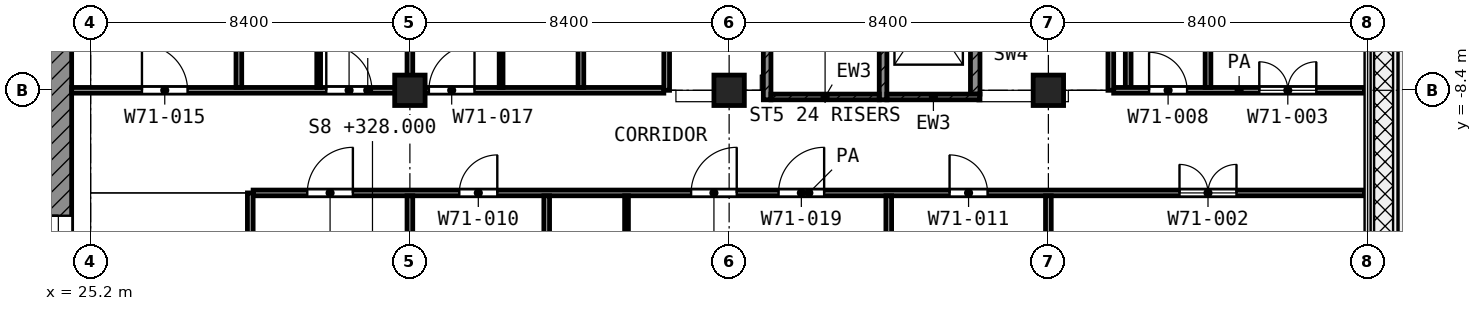
"""IFC4 building model, lengths in metres.
Left out: names, types, materials, properties, quantities, classifications, styles, units other than length and angle.
Written with IfcOpenShell. Run it as: python <this file> out.ifc"""

import sys

from ifc_helpers import new_model, si_unit, direction, frame, frame_2d, origin, origin_2d, place, context, subcontext, project, spatial, rectangle, extrude, element, fill, save


model = new_model("IFC4")
c1 = context("Model", 3, precision=1e-05, world=origin(), true_north=direction((0.0, 1.0)))
c2 = subcontext(c1, "Body", "Model", "MODEL_VIEW")
j1 = project(units=[si_unit("LENGTHUNIT", "METRE"), si_unit("PLANEANGLEUNIT", "RADIAN")], contexts=[c1])
p1 = place(None, origin())
s1 = spatial("IfcSite", under=j1, at=p1, CompositionType="ELEMENT")
p2 = place(p1, origin())
s2 = spatial("IfcBuilding", under=s1, at=p2, CompositionType="ELEMENT")
p3 = place(p2, frame((0.0, 0.0, 328.0)))
s3 = spatial("IfcBuildingStorey", under=s2, at=p3, CompositionType="ELEMENT", Elevation=328.0)
for number, where, z_axis, x_axis in (
    (1, (33.6, -8.4, 0.0), (0.0, 0.0, 1.0), (1.0, 0.0, 0.0)),
    (2, (42.0, -8.4, 0.0), (0.0, 0.0, 1.0), (1.0, 0.0, 0.0)),
    (3, (50.4, -8.4, 0.0), (0.0, 0.0, 1.0), (1.0, 0.0, 0.0)),
):
    element("IfcColumn", number, at=place(p3, frame(where, z_axis=z_axis, x_axis=x_axis)), inside=s3, PredefinedType="COLUMN", context=c2, shape_type="SweptSolid", body=[
        extrude(rectangle(XDim=0.8, YDim=0.8, at=origin_2d()), origin(), (0.0, 0.0, 1.0), 4.2),
    ])
p4 = place(p3, frame((24.35, -24.0, 0.0), z_axis=(0.0, 0.0, 1.0), x_axis=(0.0, 1.0, 0.0)))
e4 = element("IfcWall", 4, at=p4, inside=s3, PredefinedType="SHEAR", context=c2, shape_type="SweptSolid", body=[
    extrude(rectangle(XDim=18.6, YDim=0.7, at=frame_2d((9.3, 0.0))), origin(), (0.0, 0.0, 1.0), 3.78),
])
p5 = place(p4, frame((10.5, 0.0, 0.0)))
e5 = element("IfcOpeningElement", 5, at=p5, cuts=e4, PredefinedType="OPENING", context=c2, shape_type="SweptSolid", body=[
    extrude(rectangle(XDim=1.8, YDim=2.1, at=frame_2d((0.9, 1.05))), frame((0.0, 0.36, 0.0), z_axis=(0.0, -1.0, 0.0), x_axis=(1.0, 0.0, 0.0)), (0.0, 0.0, 1.0), 0.72),
])
p6 = place(p3, frame((43.0, -8.65, 0.0), z_axis=(0.0, 0.0, 1.0), x_axis=(0.0, 1.0, 0.0)))
e6 = element("IfcWall", 6, at=p6, inside=s3, PredefinedType="SHEAR", context=c2, shape_type="SweptSolid", body=[
    extrude(rectangle(XDim=8.35, YDim=0.2, at=frame_2d((4.175, 0.0))), origin(), (0.0, 0.0, 1.0), 3.78),
])
p7 = place(p6, frame((7.0, 0.0, 0.0)))
e7 = element("IfcOpeningElement", 7, at=p7, cuts=e6, PredefinedType="OPENING", context=c2, shape_type="SweptSolid", body=[
    extrude(rectangle(XDim=1.1, YDim=2.1, at=frame_2d((0.55, 1.05))), frame((0.0, 0.11, 0.0), z_axis=(0.0, -1.0, 0.0), x_axis=(1.0, 0.0, 0.0)), (0.0, 0.0, 1.0), 0.22),
])
p8 = place(p3, frame((46.05, -8.65, 0.0), z_axis=(0.0, 0.0, 1.0), x_axis=(0.0, 1.0, 0.0)))
e8 = element("IfcWall", 8, at=p8, inside=s3, PredefinedType="SHEAR", context=c2, shape_type="SweptSolid", body=[
    extrude(rectangle(XDim=8.35, YDim=0.2, at=frame_2d((4.175, 0.0))), origin(), (0.0, 0.0, 1.0), 3.78),
])
p9 = place(p8, frame((7.0, 0.0, 0.0)))
e9 = element("IfcOpeningElement", 9, at=p9, cuts=e8, PredefinedType="OPENING", context=c2, shape_type="SweptSolid", body=[
    extrude(rectangle(XDim=1.1, YDim=2.1, at=frame_2d((0.55, 1.05))), frame((0.0, 0.11, 0.0), z_axis=(0.0, -1.0, 0.0), x_axis=(1.0, 0.0, 0.0)), (0.0, 0.0, 1.0), 0.22),
])
p10 = place(p3, frame((43.1, -8.575, 0.0), z_axis=(0.0, 0.0, 1.0), x_axis=(1.0, 0.0, 0.0)))
e10 = element("IfcWall", 10, at=p10, inside=s3, PredefinedType="SHEAR", context=c2, shape_type="SweptSolid", body=[
    extrude(rectangle(XDim=2.85, YDim=0.15, at=frame_2d((1.425, 0.0))), origin(), (0.0, 0.0, 1.0), 3.78),
])
p11 = place(p3, frame((46.15, -8.575, 0.0), z_axis=(0.0, 0.0, 1.0), x_axis=(1.0, 0.0, 0.0)))
e11 = element("IfcWall", 11, at=p11, inside=s3, PredefinedType="SHEAR", context=c2, shape_type="SweptSolid", body=[
    extrude(rectangle(XDim=2.45, YDim=0.15, at=frame_2d((1.225, 0.0))), origin(), (0.0, 0.0, 1.0), 3.78),
])
p12 = place(p3, frame((48.475, -8.5, 0.0), z_axis=(0.0, 0.0, 1.0), x_axis=(0.0, 1.0, 0.0)))
e12 = element("IfcWall", 12, at=p12, inside=s3, PredefinedType="SHEAR", context=c2, shape_type="SweptSolid", body=[
    extrude(rectangle(XDim=3.475, YDim=0.25, at=frame_2d((1.738, 0.0))), origin(), (0.0, 0.0, 1.0), 3.78),
])
for number, where, z_axis, x_axis in (
    (13, (31.2, -8.325, 0.0), (0.0, 0.0, 1.0), (0.0, 1.0, 0.0)),
    (14, (36.0, -8.325, 0.0), (0.0, 0.0, 1.0), (0.0, 1.0, 0.0)),
    (15, (39.3, -13.8, 0.0), (0.0, 0.0, 1.0), (0.0, 1.0, 0.0)),
):
    element("IfcWall", number, at=place(p3, frame(where, z_axis=z_axis, x_axis=x_axis)), inside=s3, PredefinedType="PARTITIONING", context=c2, shape_type="SweptSolid", body=[
        extrude(rectangle(XDim=2.625, YDim=0.1, at=frame_2d((1.312, 0.0))), origin(), (0.0, 0.0, 1.0), 3.78),
    ])
p13 = place(p3, frame((29.475, -11.1, 0.0), z_axis=(0.0, 0.0, 1.0), x_axis=(1.0, 0.0, 0.0)))
e16 = element("IfcWall", 16, at=p13, inside=s3, PredefinedType="PARTITIONING", context=c2, shape_type="SweptSolid", body=[
    extrude(rectangle(XDim=29.245, YDim=0.15, at=frame_2d((14.623, 0.0))), origin(), (0.0, 0.0, 1.0), 3.78),
])
p14 = place(p13, frame((1.425, 0.0, 0.0)))
e17 = element("IfcOpeningElement", 17, at=p14, cuts=e16, PredefinedType="OPENING", context=c2, shape_type="SweptSolid", body=[
    extrude(rectangle(XDim=1.2, YDim=2.1, at=frame_2d((0.6, 1.05))), frame((0.0, 0.085, 0.0), z_axis=(0.0, -1.0, 0.0), x_axis=(1.0, 0.0, 0.0)), (0.0, 0.0, 1.0), 0.17),
])
p15 = place(p13, frame((5.425, 0.0, 0.0)))
e18 = element("IfcOpeningElement", 18, at=p15, cuts=e16, PredefinedType="OPENING", context=c2, shape_type="SweptSolid", body=[
    extrude(rectangle(XDim=1.0, YDim=2.1, at=frame_2d((0.5, 1.05))), frame((0.0, 0.085, 0.0), z_axis=(0.0, -1.0, 0.0), x_axis=(1.0, 0.0, 0.0)), (0.0, 0.0, 1.0), 0.17),
])
p16 = place(p13, frame((13.825, 0.0, 0.0)))
e19 = element("IfcOpeningElement", 19, at=p16, cuts=e16, PredefinedType="OPENING", context=c2, shape_type="SweptSolid", body=[
    extrude(rectangle(XDim=1.2, YDim=2.1, at=frame_2d((0.6, 1.05))), frame((0.0, 0.085, 0.0), z_axis=(0.0, -1.0, 0.0), x_axis=(1.0, 0.0, 0.0)), (0.0, 0.0, 1.0), 0.17),
])
p17 = place(p13, frame((11.525, 0.0, 0.0)))
e20 = element("IfcOpeningElement", 20, at=p17, cuts=e16, PredefinedType="OPENING", context=c2, shape_type="SweptSolid", body=[
    extrude(rectangle(XDim=1.2, YDim=2.1, at=frame_2d((0.6, 1.05))), frame((0.0, 0.085, 0.0), z_axis=(0.0, -1.0, 0.0), x_axis=(1.0, 0.0, 0.0)), (0.0, 0.0, 1.0), 0.17),
])
p18 = place(p13, frame((18.325, 0.0, 0.0)))
e21 = element("IfcOpeningElement", 21, at=p18, cuts=e16, PredefinedType="OPENING", context=c2, shape_type="SweptSolid", body=[
    extrude(rectangle(XDim=1.0, YDim=2.1, at=frame_2d((0.5, 1.05))), frame((0.0, 0.085, 0.0), z_axis=(0.0, -1.0, 0.0), x_axis=(1.0, 0.0, 0.0)), (0.0, 0.0, 1.0), 0.17),
])
p19 = place(p13, frame((24.375, 0.0, 0.0)))
e22 = element("IfcOpeningElement", 22, at=p19, cuts=e16, PredefinedType="OPENING", context=c2, shape_type="SweptSolid", body=[
    extrude(rectangle(XDim=1.5, YDim=2.1, at=frame_2d((0.75, 1.05))), frame((0.0, 0.085, 0.0), z_axis=(0.0, -1.0, 0.0), x_axis=(1.0, 0.0, 0.0)), (0.0, 0.0, 1.0), 0.17),
])
p20 = place(p3, frame((24.7, -8.4, 0.0), z_axis=(0.0, 0.0, 1.0), x_axis=(1.0, 0.0, 0.0)))
e23 = element("IfcWall", 23, at=p20, inside=s3, PredefinedType="PARTITIONING", context=c2, shape_type="SweptSolid", body=[
    extrude(rectangle(XDim=15.582, YDim=0.15, at=frame_2d((7.791, 0.0))), origin(), (0.0, 0.0, 1.0), 3.78),
])
p21 = place(p20, frame((1.85, 0.0, 0.0)))
e24 = element("IfcOpeningElement", 24, at=p21, cuts=e23, PredefinedType="OPENING", context=c2, shape_type="SweptSolid", body=[
    extrude(rectangle(XDim=1.2, YDim=2.1, at=frame_2d((0.6, 1.05))), frame((0.0, 0.085, 0.0), z_axis=(0.0, -1.0, 0.0), x_axis=(1.0, 0.0, 0.0)), (0.0, 0.0, 1.0), 0.17),
])
p22 = place(p20, frame((6.7, 0.0, 0.0)))
e25 = element("IfcOpeningElement", 25, at=p22, cuts=e23, PredefinedType="OPENING", context=c2, shape_type="SweptSolid", body=[
    extrude(rectangle(XDim=1.2, YDim=2.1, at=frame_2d((0.6, 1.05))), frame((0.0, 0.085, 0.0), z_axis=(0.0, -1.0, 0.0), x_axis=(1.0, 0.0, 0.0)), (0.0, 0.0, 1.0), 0.17),
])
p23 = place(p20, frame((9.4, 0.0, 0.0)))
e26 = element("IfcOpeningElement", 26, at=p23, cuts=e23, PredefinedType="OPENING", context=c2, shape_type="SweptSolid", body=[
    extrude(rectangle(XDim=1.2, YDim=2.1, at=frame_2d((0.6, 1.05))), frame((0.0, 0.085, 0.0), z_axis=(0.0, -1.0, 0.0), x_axis=(1.0, 0.0, 0.0)), (0.0, 0.0, 1.0), 0.17),
])
p24 = place(p3, frame((52.118, -8.4, 0.0), z_axis=(0.0, 0.0, 1.0), x_axis=(1.0, 0.0, 0.0)))
e27 = element("IfcWall", 27, at=p24, inside=s3, PredefinedType="PARTITIONING", context=c2, shape_type="SweptSolid", body=[
    extrude(rectangle(XDim=6.602, YDim=0.15, at=frame_2d((3.301, 0.0))), origin(), (0.0, 0.0, 1.0), 3.78),
])
p25 = place(p24, frame((0.932, 0.0, 0.0)))
e28 = element("IfcOpeningElement", 28, at=p25, cuts=e27, PredefinedType="OPENING", context=c2, shape_type="SweptSolid", body=[
    extrude(rectangle(XDim=1.0, YDim=2.1, at=frame_2d((0.5, 1.05))), frame((0.0, 0.085, 0.0), z_axis=(0.0, -1.0, 0.0), x_axis=(1.0, 0.0, 0.0)), (0.0, 0.0, 1.0), 0.17),
])
p26 = place(p24, frame((3.832, 0.0, 0.0)))
e29 = element("IfcOpeningElement", 29, at=p26, cuts=e27, PredefinedType="OPENING", context=c2, shape_type="SweptSolid", body=[
    extrude(rectangle(XDim=1.5, YDim=2.1, at=frame_2d((0.75, 1.05))), frame((0.0, 0.085, 0.0), z_axis=(0.0, -1.0, 0.0), x_axis=(1.0, 0.0, 0.0)), (0.0, 0.0, 1.0), 0.17),
])
p27 = place(p3, frame((29.1, -8.325, 0.0), z_axis=(0.0, 0.0, 1.0), x_axis=(0.0, 1.0, 0.0)))
e30 = element("IfcWall", 30, at=p27, inside=s3, PredefinedType="PARTITIONING", context=c2, shape_type="SweptSolid", body=[
    extrude(rectangle(XDim=8.245, YDim=0.15, at=frame_2d((4.123, 0.0))), origin(), (0.0, 0.0, 1.0), 3.78),
])
p28 = place(p3, frame((29.4, -31.198, 0.0), z_axis=(0.0, 0.0, 1.0), x_axis=(0.0, 1.0, 0.0)))
e31 = element("IfcWall", 31, at=p28, inside=s3, PredefinedType="PARTITIONING", context=c2, shape_type="SweptSolid", body=[
    extrude(rectangle(XDim=20.098, YDim=0.15, at=frame_2d((10.049, 0.0))), origin(), (0.0, 0.0, 1.0), 3.78),
])
p29 = place(p3, frame((33.6, -28.687, 0.0), z_axis=(0.0, 0.0, 1.0), x_axis=(0.0, 1.0, 0.0)))
e32 = element("IfcWall", 32, at=p29, inside=s3, PredefinedType="PARTITIONING", context=c2, shape_type="SweptSolid", body=[
    extrude(rectangle(XDim=17.512, YDim=0.15, at=frame_2d((8.756, 0.0))), origin(), (0.0, 0.0, 1.0), 3.78),
])
p30 = place(p3, frame((33.6, -8.325, 0.0), z_axis=(0.0, 0.0, 1.0), x_axis=(0.0, 1.0, 0.0)))
e33 = element("IfcWall", 33, at=p30, inside=s3, PredefinedType="PARTITIONING", context=c2, shape_type="SweptSolid", body=[
    extrude(rectangle(XDim=8.245, YDim=0.15, at=frame_2d((4.123, 0.0))), origin(), (0.0, 0.0, 1.0), 3.78),
])
p31 = place(p3, frame((37.2, -25.12, 0.0), z_axis=(0.0, 0.0, 1.0), x_axis=(0.0, 1.0, 0.0)))
e34 = element("IfcWall", 34, at=p31, inside=s3, PredefinedType="PARTITIONING", context=c2, shape_type="SweptSolid", body=[
    extrude(rectangle(XDim=13.945, YDim=0.15, at=frame_2d((6.973, 0.0))), origin(), (0.0, 0.0, 1.0), 3.78),
])
p32 = place(p3, frame((38.1, -8.325, 0.0), z_axis=(0.0, 0.0, 1.0), x_axis=(0.0, 1.0, 0.0)))
e35 = element("IfcWall", 35, at=p32, inside=s3, PredefinedType="PARTITIONING", context=c2, shape_type="SweptSolid", body=[
    extrude(rectangle(XDim=8.245, YDim=0.15, at=frame_2d((4.123, 0.0))), origin(), (0.0, 0.0, 1.0), 3.78),
])
p33 = place(p3, frame((40.357, -8.4, 0.0), z_axis=(0.0, 0.0, 1.0), x_axis=(0.0, 1.0, 0.0)))
e36 = element("IfcWall", 36, at=p33, inside=s3, PredefinedType="PARTITIONING", context=c2, shape_type="SweptSolid", body=[
    extrude(rectangle(XDim=8.32, YDim=0.15, at=frame_2d((4.16, 0.0))), origin(), (0.0, 0.0, 1.0), 3.78),
])
p34 = place(p33, frame((3.7, 0.0, 0.0)))
e37 = element("IfcOpeningElement", 37, at=p34, cuts=e36, PredefinedType="OPENING", context=c2, shape_type="SweptSolid", body=[
    extrude(rectangle(XDim=1.0, YDim=2.1, at=frame_2d((0.5, 1.05))), frame((0.0, 0.085, 0.0), z_axis=(0.0, -1.0, 0.0), x_axis=(1.0, 0.0, 0.0)), (0.0, 0.0, 1.0), 0.17),
])
for number, where, z_axis, x_axis in (
    (38, (46.2, -25.12, 0.0), (0.0, 0.0, 1.0), (0.0, 1.0, 0.0)),
    (39, (50.4, -25.12, 0.0), (0.0, 0.0, 1.0), (0.0, 1.0, 0.0)),
):
    element("IfcWall", number, at=place(p3, frame(where, z_axis=z_axis, x_axis=x_axis)), inside=s3, PredefinedType="PARTITIONING", context=c2, shape_type="SweptSolid", body=[
        extrude(rectangle(XDim=13.945, YDim=0.15, at=frame_2d((6.973, 0.0))), origin(), (0.0, 0.0, 1.0), 3.78),
    ])
p35 = place(p3, frame((52.043, -8.4, 0.0), z_axis=(0.0, 0.0, 1.0), x_axis=(0.0, 1.0, 0.0)))
e40 = element("IfcWall", 40, at=p35, inside=s3, PredefinedType="PARTITIONING", context=c2, shape_type="SweptSolid", body=[
    extrude(rectangle(XDim=6.548, YDim=0.15, at=frame_2d((3.274, 0.0))), origin(), (0.0, 0.0, 1.0), 3.78),
])
p36 = place(p3, frame((52.5, -8.325, 0.0), z_axis=(0.0, 0.0, 1.0), x_axis=(0.0, 1.0, 0.0)))
e41 = element("IfcWall", 41, at=p36, inside=s3, PredefinedType="PARTITIONING", context=c2, shape_type="SweptSolid", body=[
    extrude(rectangle(XDim=7.923, YDim=0.15, at=frame_2d((3.961, 0.0))), origin(), (0.0, 0.0, 1.0), 3.78),
])
p37 = place(p3, frame((54.6, -8.325, 0.0), z_axis=(0.0, 0.0, 1.0), x_axis=(0.0, 1.0, 0.0)))
e42 = element("IfcWall", 42, at=p37, inside=s3, PredefinedType="PARTITIONING", context=c2, shape_type="SweptSolid", body=[
    extrude(rectangle(XDim=6.412, YDim=0.15, at=frame_2d((3.206, 0.0))), origin(), (0.0, 0.0, 1.0), 3.78),
])
p38 = place(p5, origin())
e43 = element("IfcDoor", 43, at=p38, inside=s3, OperationType="DOUBLE_DOOR_SINGLE_SWING", PredefinedType="DOOR", context=c2, shape_type="SweptSolid", body=[
    extrude(rectangle(XDim=1.8, YDim=2.1, at=frame_2d((0.9, 1.05))), frame((0.0, 0.025, 0.0), z_axis=(0.0, -1.0, 0.0), x_axis=(1.0, 0.0, 0.0)), (0.0, 0.0, 1.0), 0.05),
])
fill(e5, e43)
p39 = place(p21, origin())
e44 = element("IfcDoor", 44, at=p39, inside=s3, OperationType="SINGLE_SWING_LEFT", PredefinedType="DOOR", context=c2, shape_type="SweptSolid", body=[
    extrude(rectangle(XDim=1.2, YDim=2.1, at=frame_2d((0.6, 1.05))), frame((0.0, 0.025, 0.0), z_axis=(0.0, -1.0, 0.0), x_axis=(1.0, 0.0, 0.0)), (0.0, 0.0, 1.0), 0.05),
])
fill(e24, e44)
p40 = place(p22, origin())
e45 = element("IfcDoor", 45, at=p40, inside=s3, OperationType="SINGLE_SWING_LEFT", PredefinedType="DOOR", context=c2, shape_type="SweptSolid", body=[
    extrude(rectangle(XDim=1.2, YDim=2.1, at=frame_2d((0.6, 1.05))), frame((0.0, 0.025, 0.0), z_axis=(0.0, -1.0, 0.0), x_axis=(1.0, 0.0, 0.0)), (0.0, 0.0, 1.0), 0.05),
])
fill(e25, e45)
p41 = place(p23, origin())
e46 = element("IfcDoor", 46, at=p41, inside=s3, OperationType="SINGLE_SWING_RIGHT", PredefinedType="DOOR", context=c2, shape_type="SweptSolid", body=[
    extrude(rectangle(XDim=1.2, YDim=2.1, at=frame_2d((0.6, 1.05))), frame((0.0, 0.025, 0.0), z_axis=(0.0, -1.0, 0.0), x_axis=(1.0, 0.0, 0.0)), (0.0, 0.0, 1.0), 0.05),
])
fill(e26, e46)
p42 = place(p14, origin())
e47 = element("IfcDoor", 47, at=p42, inside=s3, OperationType="SINGLE_SWING_RIGHT", PredefinedType="DOOR", context=c2, shape_type="SweptSolid", body=[
    extrude(rectangle(XDim=1.2, YDim=2.1, at=frame_2d((0.6, 1.05))), frame((0.0, 0.025, 0.0), z_axis=(0.0, -1.0, 0.0), x_axis=(1.0, 0.0, 0.0)), (0.0, 0.0, 1.0), 0.05),
])
fill(e17, e47)
p43 = place(p15, origin())
e48 = element("IfcDoor", 48, at=p43, inside=s3, OperationType="SINGLE_SWING_RIGHT", PredefinedType="DOOR", context=c2, shape_type="SweptSolid", body=[
    extrude(rectangle(XDim=1.0, YDim=2.1, at=frame_2d((0.5, 1.05))), frame((0.0, 0.025, 0.0), z_axis=(0.0, -1.0, 0.0), x_axis=(1.0, 0.0, 0.0)), (0.0, 0.0, 1.0), 0.05),
])
fill(e18, e48)
p44 = place(p16, origin())
e49 = element("IfcDoor", 49, at=p44, inside=s3, OperationType="SINGLE_SWING_RIGHT", PredefinedType="DOOR", context=c2, shape_type="SweptSolid", body=[
    extrude(rectangle(XDim=1.2, YDim=2.1, at=frame_2d((0.6, 1.05))), frame((0.0, 0.025, 0.0), z_axis=(0.0, -1.0, 0.0), x_axis=(1.0, 0.0, 0.0)), (0.0, 0.0, 1.0), 0.05),
])
fill(e19, e49)
p45 = place(p17, origin())
e50 = element("IfcDoor", 50, at=p45, inside=s3, OperationType="SINGLE_SWING_RIGHT", PredefinedType="DOOR", context=c2, shape_type="SweptSolid", body=[
    extrude(rectangle(XDim=1.2, YDim=2.1, at=frame_2d((0.6, 1.05))), frame((0.0, 0.025, 0.0), z_axis=(0.0, -1.0, 0.0), x_axis=(1.0, 0.0, 0.0)), (0.0, 0.0, 1.0), 0.05),
])
fill(e20, e50)
p46 = place(p18, origin())
e51 = element("IfcDoor", 51, at=p46, inside=s3, OperationType="SINGLE_SWING_LEFT", PredefinedType="DOOR", context=c2, shape_type="SweptSolid", body=[
    extrude(rectangle(XDim=1.0, YDim=2.1, at=frame_2d((0.5, 1.05))), frame((0.0, 0.025, 0.0), z_axis=(0.0, -1.0, 0.0), x_axis=(1.0, 0.0, 0.0)), (0.0, 0.0, 1.0), 0.05),
])
fill(e21, e51)
p47 = place(p19, origin())
e52 = element("IfcDoor", 52, at=p47, inside=s3, OperationType="DOUBLE_DOOR_SINGLE_SWING", PredefinedType="DOOR", context=c2, shape_type="SweptSolid", body=[
    extrude(rectangle(XDim=1.5, YDim=2.1, at=frame_2d((0.75, 1.05))), frame((0.0, 0.025, 0.0), z_axis=(0.0, -1.0, 0.0), x_axis=(1.0, 0.0, 0.0)), (0.0, 0.0, 1.0), 0.05),
])
fill(e22, e52)
p48 = place(p25, origin())
e53 = element("IfcDoor", 53, at=p48, inside=s3, OperationType="SINGLE_SWING_LEFT", PredefinedType="DOOR", context=c2, shape_type="SweptSolid", body=[
    extrude(rectangle(XDim=1.0, YDim=2.1, at=frame_2d((0.5, 1.05))), frame((0.0, 0.025, 0.0), z_axis=(0.0, -1.0, 0.0), x_axis=(1.0, 0.0, 0.0)), (0.0, 0.0, 1.0), 0.05),
])
fill(e28, e53)
p49 = place(p26, origin())
e54 = element("IfcDoor", 54, at=p49, inside=s3, OperationType="DOUBLE_DOOR_SINGLE_SWING", PredefinedType="DOOR", context=c2, shape_type="SweptSolid", body=[
    extrude(rectangle(XDim=1.5, YDim=2.1, at=frame_2d((0.75, 1.05))), frame((0.0, 0.025, 0.0), z_axis=(0.0, -1.0, 0.0), x_axis=(1.0, 0.0, 0.0)), (0.0, 0.0, 1.0), 0.05),
])
fill(e29, e54)
save(model, sys.argv[1])
